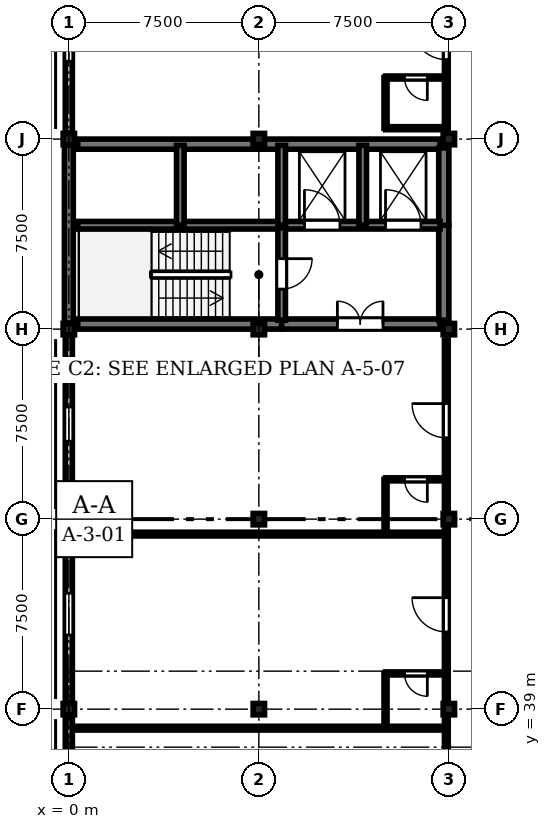
"""IFC4 building model, lengths in metres.
Left out: names, types, materials, properties, quantities, classifications, styles, units other than length and angle.
Written with IfcOpenShell. Run it as: python <this file> out.ifc"""

import sys

from ifc_helpers import new_model, si_unit, direction, frame, frame_2d, origin, origin_2d, place, context, subcontext, project, spatial, rectangle, extrude, element, fill, save


model = new_model("IFC4")
c1 = context("Model", 3, precision=1e-05, world=origin(), true_north=direction((0.0, 1.0)))
c2 = subcontext(c1, "Body", "Model", "MODEL_VIEW")
j1 = project(units=[si_unit("LENGTHUNIT", "METRE"), si_unit("PLANEANGLEUNIT", "RADIAN")], contexts=[c1])
p1 = place(None, origin())
s1 = spatial("IfcSite", under=j1, at=p1, CompositionType="ELEMENT")
p2 = place(p1, origin())
s2 = spatial("IfcBuilding", under=s1, at=p2, CompositionType="ELEMENT")
p3 = place(p2, frame((0.0, 0.0, 30.0)))
s3 = spatial("IfcBuildingStorey", under=s2, at=p3, CompositionType="ELEMENT", Elevation=30.0)
for number, where, z_axis, x_axis in (
    (1, (0.0, 39.0, 0.0), (0.0, 0.0, 1.0), (1.0, 0.0, 0.0)),
    (2, (0.0, 46.5, 0.0), (0.0, 0.0, 1.0), (1.0, 0.0, 0.0)),
    (3, (0.0, 54.0, 0.0), (0.0, 0.0, 1.0), (1.0, 0.0, 0.0)),
    (4, (0.0, 61.5, 0.0), (0.0, 0.0, 1.0), (1.0, 0.0, 0.0)),
    (5, (7.5, 39.0, 0.0), (0.0, 0.0, 1.0), (1.0, 0.0, 0.0)),
    (6, (7.5, 46.5, 0.0), (0.0, 0.0, 1.0), (1.0, 0.0, 0.0)),
    (7, (7.5, 54.0, 0.0), (0.0, 0.0, 1.0), (1.0, 0.0, 0.0)),
    (8, (7.5, 61.5, 0.0), (0.0, 0.0, 1.0), (1.0, 0.0, 0.0)),
    (9, (15.0, 39.0, 0.0), (0.0, 0.0, 1.0), (1.0, 0.0, 0.0)),
    (10, (15.0, 46.5, 0.0), (0.0, 0.0, 1.0), (1.0, 0.0, 0.0)),
    (11, (15.0, 54.0, 0.0), (0.0, 0.0, 1.0), (1.0, 0.0, 0.0)),
    (12, (15.0, 61.5, 0.0), (0.0, 0.0, 1.0), (1.0, 0.0, 0.0)),
):
    element("IfcColumn", number, at=place(p3, frame(where, z_axis=z_axis, x_axis=x_axis)), inside=s3, PredefinedType="COLUMN", context=c2, shape_type="SweptSolid", body=[
        extrude(rectangle(XDim=0.45, YDim=0.45, at=origin_2d()), origin(), (0.0, 0.0, 1.0), 4.05),
    ])
p4 = place(p3, frame((0.0, 31.735, 0.0), z_axis=(0.0, 0.0, 1.0), x_axis=(0.0, 1.0, 0.0)))
e13 = element("IfcWall", 13, at=p4, inside=s3, PredefinedType="STANDARD", context=c2, shape_type="SweptSolid", body=[
    extrude(rectangle(XDim=7.03, YDim=0.28, at=frame_2d((3.515, 0.0))), origin(), (0.0, 0.0, 1.0), 3.83),
])
p5 = place(p4, frame((2.84, 0.0, 0.85)))
e14 = element("IfcOpeningElement", 14, at=p5, cuts=e13, PredefinedType="OPENING", context=c2, shape_type="SweptSolid", body=[
    extrude(rectangle(XDim=1.35, YDim=2.25, at=frame_2d((0.675, 1.125))), frame((0.0, 0.15, 0.0), z_axis=(0.0, -1.0, 0.0), x_axis=(1.0, 0.0, 0.0)), (0.0, 0.0, 1.0), 0.3),
])
p6 = place(p3, frame((0.0, 39.235, 0.0), z_axis=(0.0, 0.0, 1.0), x_axis=(0.0, 1.0, 0.0)))
e15 = element("IfcWall", 15, at=p6, inside=s3, PredefinedType="STANDARD", context=c2, shape_type="SweptSolid", body=[
    extrude(rectangle(XDim=7.03, YDim=0.28, at=frame_2d((3.515, 0.0))), origin(), (0.0, 0.0, 1.0), 3.83),
])
p7 = place(p6, frame((2.69, 0.0, 0.85)))
e16 = element("IfcOpeningElement", 16, at=p7, cuts=e15, PredefinedType="OPENING", context=c2, shape_type="SweptSolid", body=[
    extrude(rectangle(XDim=1.65, YDim=2.25, at=frame_2d((0.825, 1.125))), frame((0.0, 0.15, 0.0), z_axis=(0.0, -1.0, 0.0), x_axis=(1.0, 0.0, 0.0)), (0.0, 0.0, 1.0), 0.3),
])
p8 = place(p3, frame((0.0, 46.735, 0.0), z_axis=(0.0, 0.0, 1.0), x_axis=(0.0, 1.0, 0.0)))
e17 = element("IfcWall", 17, at=p8, inside=s3, PredefinedType="STANDARD", context=c2, shape_type="SweptSolid", body=[
    extrude(rectangle(XDim=7.03, YDim=0.28, at=frame_2d((3.515, 0.0))), origin(), (0.0, 0.0, 1.0), 3.83),
])
p9 = place(p8, frame((2.84, 0.0, 0.85)))
e18 = element("IfcOpeningElement", 18, at=p9, cuts=e17, PredefinedType="OPENING", context=c2, shape_type="SweptSolid", body=[
    extrude(rectangle(XDim=1.35, YDim=2.25, at=frame_2d((0.675, 1.125))), frame((0.0, 0.15, 0.0), z_axis=(0.0, -1.0, 0.0), x_axis=(1.0, 0.0, 0.0)), (0.0, 0.0, 1.0), 0.3),
])
p10 = place(p3, frame((0.0, 54.235, 0.0), z_axis=(0.0, 0.0, 1.0), x_axis=(0.0, 1.0, 0.0)))
e19 = element("IfcWall", 19, at=p10, inside=s3, PredefinedType="SHEAR", context=c2, shape_type="SweptSolid", body=[
    extrude(rectangle(XDim=7.03, YDim=0.35, at=frame_2d((3.515, 0.0))), origin(), (0.0, 0.0, 1.0), 3.83),
])
p11 = place(p3, frame((0.0, 61.735, 0.0), z_axis=(0.0, 0.0, 1.0), x_axis=(0.0, 1.0, 0.0)))
e20 = element("IfcWall", 20, at=p11, inside=s3, PredefinedType="STANDARD", context=c2, shape_type="SweptSolid", body=[
    extrude(rectangle(XDim=7.03, YDim=0.28, at=frame_2d((3.515, 0.0))), origin(), (0.0, 0.0, 1.0), 3.83),
])
p12 = place(p11, frame((2.84, 0.0, 0.85)))
e21 = element("IfcOpeningElement", 21, at=p12, cuts=e20, PredefinedType="OPENING", context=c2, shape_type="SweptSolid", body=[
    extrude(rectangle(XDim=1.35, YDim=2.25, at=frame_2d((0.675, 1.125))), frame((0.0, 0.15, 0.0), z_axis=(0.0, -1.0, 0.0), x_axis=(1.0, 0.0, 0.0)), (0.0, 0.0, 1.0), 0.3),
])
p13 = place(p3, frame((0.35, 54.2, 0.0), z_axis=(0.0, 0.0, 1.0), x_axis=(1.0, 0.0, 0.0)))
e22 = element("IfcWall", 22, at=p13, inside=s3, PredefinedType="SHEAR", context=c2, shape_type="SweptSolid", body=[
    extrude(rectangle(XDim=8.05, YDim=0.4, at=frame_2d((4.025, 0.0))), origin(), (0.0, 0.0, 1.0), 3.83),
])
p14 = place(p3, frame((8.4, 54.2, 0.0), z_axis=(0.0, 0.0, 1.0), x_axis=(1.0, 0.0, 0.0)))
e23 = element("IfcWall", 23, at=p14, inside=s3, PredefinedType="SHEAR", context=c2, shape_type="SweptSolid", body=[
    extrude(rectangle(XDim=6.25, YDim=0.4, at=frame_2d((3.125, 0.0))), origin(), (0.0, 0.0, 1.0), 3.83),
])
p15 = place(p14, frame((2.2, 0.0, 0.0)))
e24 = element("IfcOpeningElement", 24, at=p15, cuts=e23, PredefinedType="OPENING", context=c2, shape_type="SweptSolid", body=[
    extrude(rectangle(XDim=1.8, YDim=2.25, at=frame_2d((0.9, 1.125))), frame((0.0, 0.21, 0.0), z_axis=(0.0, -1.0, 0.0), x_axis=(1.0, 0.0, 0.0)), (0.0, 0.0, 1.0), 0.42),
])
p16 = place(p3, frame((0.35, 61.3, 0.0), z_axis=(0.0, 0.0, 1.0), x_axis=(1.0, 0.0, 0.0)))
e25 = element("IfcWall", 25, at=p16, inside=s3, PredefinedType="SHEAR", context=c2, shape_type="SweptSolid", body=[
    extrude(rectangle(XDim=14.3, YDim=0.4, at=frame_2d((7.15, 0.0))), origin(), (0.0, 0.0, 1.0), 3.83),
])
p17 = place(p3, frame((14.8, 54.35, 0.0), z_axis=(0.0, 0.0, 1.0), x_axis=(0.0, 1.0, 0.0)))
e26 = element("IfcWall", 26, at=p17, inside=s3, PredefinedType="SHEAR", context=c2, shape_type="SweptSolid", body=[
    extrude(rectangle(XDim=3.75, YDim=0.4, at=frame_2d((1.875, 0.0))), origin(), (0.0, 0.0, 1.0), 3.83),
])
p18 = place(p3, frame((14.8, 58.1, 0.0), z_axis=(0.0, 0.0, 1.0), x_axis=(0.0, 1.0, 0.0)))
e27 = element("IfcWall", 27, at=p18, inside=s3, PredefinedType="SHEAR", context=c2, shape_type="SweptSolid", body=[
    extrude(rectangle(XDim=3.05, YDim=0.4, at=frame_2d((1.525, 0.0))), origin(), (0.0, 0.0, 1.0), 3.83),
])
p19 = place(p3, frame((0.35, 58.1, 0.0), z_axis=(0.0, 0.0, 1.0), x_axis=(1.0, 0.0, 0.0)))
e28 = element("IfcWall", 28, at=p19, inside=s3, PredefinedType="SHEAR", context=c2, shape_type="SweptSolid", body=[
    extrude(rectangle(XDim=8.05, YDim=0.3, at=frame_2d((4.025, 0.0))), origin(), (0.0, 0.0, 1.0), 3.83),
])
p20 = place(p3, frame((8.4, 58.1, 0.0), z_axis=(0.0, 0.0, 1.0), x_axis=(1.0, 0.0, 0.0)))
e29 = element("IfcWall", 29, at=p20, inside=s3, PredefinedType="SHEAR", context=c2, shape_type="SweptSolid", body=[
    extrude(rectangle(XDim=6.25, YDim=0.3, at=frame_2d((3.125, 0.0))), origin(), (0.0, 0.0, 1.0), 3.83),
])
p21 = place(p20, frame((0.9, 0.0, 0.0)))
e30 = element("IfcOpeningElement", 30, at=p21, cuts=e29, PredefinedType="OPENING", context=c2, shape_type="SweptSolid", body=[
    extrude(rectangle(XDim=1.4, YDim=2.25, at=frame_2d((0.7, 1.125))), frame((0.0, 0.16, 0.0), z_axis=(0.0, -1.0, 0.0), x_axis=(1.0, 0.0, 0.0)), (0.0, 0.0, 1.0), 0.32),
])
p22 = place(p20, frame((4.1, 0.0, 0.0)))
e31 = element("IfcOpeningElement", 31, at=p22, cuts=e29, PredefinedType="OPENING", context=c2, shape_type="SweptSolid", body=[
    extrude(rectangle(XDim=1.4, YDim=2.25, at=frame_2d((0.7, 1.125))), frame((0.0, 0.16, 0.0), z_axis=(0.0, -1.0, 0.0), x_axis=(1.0, 0.0, 0.0)), (0.0, 0.0, 1.0), 0.32),
])
p23 = place(p3, frame((8.4, 58.0, 0.0), z_axis=(0.0, 0.0, 1.0), x_axis=(0.0, -1.0, 0.0)))
e32 = element("IfcWall", 32, at=p23, inside=s3, PredefinedType="SHEAR", context=c2, shape_type="SweptSolid", body=[
    extrude(rectangle(XDim=3.65, YDim=0.3, at=frame_2d((1.825, 0.0))), origin(), (0.0, 0.0, 1.0), 3.83),
])
p24 = place(p23, frame((1.22, 0.0, 0.0)))
e33 = element("IfcOpeningElement", 33, at=p24, cuts=e32, PredefinedType="OPENING", context=c2, shape_type="SweptSolid", body=[
    extrude(rectangle(XDim=1.2, YDim=2.25, at=frame_2d((0.6, 1.125))), frame((0.0, 0.16, 0.0), z_axis=(0.0, -1.0, 0.0), x_axis=(1.0, 0.0, 0.0)), (0.0, 0.0, 1.0), 0.32),
])
for number, where, z_axis, x_axis in (
    (34, (4.4, 58.1, 0.0), (0.0, 0.0, 1.0), (0.0, 1.0, 0.0)),
    (35, (8.4, 58.1, 0.0), (0.0, 0.0, 1.0), (0.0, 1.0, 0.0)),
    (36, (11.6, 58.1, 0.0), (0.0, 0.0, 1.0), (0.0, 1.0, 0.0)),
):
    element("IfcWall", number, at=place(p3, frame(where, z_axis=z_axis, x_axis=x_axis)), inside=s3, PredefinedType="SHEAR", context=c2, shape_type="SweptSolid", body=[
        extrude(rectangle(XDim=3.15, YDim=0.3, at=frame_2d((1.575, 0.0))), origin(), (0.0, 0.0, 1.0), 3.83),
    ])
p25 = place(p3, frame((14.9, 30.75, 0.0), z_axis=(0.0, 0.0, 1.0), x_axis=(0.0, 1.0, 0.0)))
e37 = element("IfcWall", 37, at=p25, inside=s3, PredefinedType="PARTITIONING", context=c2, shape_type="SweptSolid", body=[
    extrude(rectangle(XDim=7.5, YDim=0.15, at=frame_2d((3.75, 0.0))), origin(), (0.0, 0.0, 1.0), 3.815),
])
p26 = place(p25, frame((3.64, 0.0, 0.0)))
e38 = element("IfcOpeningElement", 38, at=p26, cuts=e37, PredefinedType="OPENING", context=c2, shape_type="SweptSolid", body=[
    extrude(rectangle(XDim=1.35, YDim=2.25, at=frame_2d((0.675, 1.125))), frame((0.0, 0.085, 0.0), z_axis=(0.0, -1.0, 0.0), x_axis=(1.0, 0.0, 0.0)), (0.0, 0.0, 1.0), 0.17),
])
p27 = place(p3, frame((14.9, 38.41, 0.0), z_axis=(0.0, 0.0, 1.0), x_axis=(0.0, 1.0, 0.0)))
e39 = element("IfcWall", 39, at=p27, inside=s3, PredefinedType="PARTITIONING", context=c2, shape_type="SweptSolid", body=[
    extrude(rectangle(XDim=7.5, YDim=0.15, at=frame_2d((3.75, 0.0))), origin(), (0.0, 0.0, 1.0), 3.815),
])
p28 = place(p27, frame((3.64, 0.0, 0.0)))
e40 = element("IfcOpeningElement", 40, at=p28, cuts=e39, PredefinedType="OPENING", context=c2, shape_type="SweptSolid", body=[
    extrude(rectangle(XDim=1.35, YDim=2.25, at=frame_2d((0.675, 1.125))), frame((0.0, 0.085, 0.0), z_axis=(0.0, -1.0, 0.0), x_axis=(1.0, 0.0, 0.0)), (0.0, 0.0, 1.0), 0.17),
])
p29 = place(p3, frame((14.9, 40.41, 0.0), z_axis=(0.0, 0.0, 1.0), x_axis=(-1.0, 0.0, 0.0)))
e41 = element("IfcWall", 41, at=p29, inside=s3, PredefinedType="PARTITIONING", context=c2, shape_type="SweptSolid", body=[
    extrude(rectangle(XDim=2.4, YDim=0.12, at=frame_2d((1.2, 0.0))), origin(), (0.0, 0.0, 1.0), 3.815),
])
p30 = place(p29, frame((0.75, 0.0, 0.0)))
e42 = element("IfcOpeningElement", 42, at=p30, cuts=e41, PredefinedType="OPENING", context=c2, shape_type="SweptSolid", body=[
    extrude(rectangle(XDim=0.9, YDim=2.1, at=frame_2d((0.45, 1.05))), frame((0.0, 0.07, 0.0), z_axis=(0.0, -1.0, 0.0), x_axis=(1.0, 0.0, 0.0)), (0.0, 0.0, 1.0), 0.14),
])
p31 = place(p3, frame((12.5, 38.41, 0.0), z_axis=(0.0, 0.0, 1.0), x_axis=(0.0, 1.0, 0.0)))
e43 = element("IfcWall", 43, at=p31, inside=s3, PredefinedType="PARTITIONING", context=c2, shape_type="SweptSolid", body=[
    extrude(rectangle(XDim=2.0, YDim=0.12, at=frame_2d((1.0, 0.0))), origin(), (0.0, 0.0, 1.0), 3.815),
])
p32 = place(p3, frame((14.9, 46.07, 0.0), z_axis=(0.0, 0.0, 1.0), x_axis=(0.0, 1.0, 0.0)))
e44 = element("IfcWall", 44, at=p32, inside=s3, PredefinedType="PARTITIONING", context=c2, shape_type="SweptSolid", body=[
    extrude(rectangle(XDim=7.5, YDim=0.15, at=frame_2d((3.75, 0.0))), origin(), (0.0, 0.0, 1.0), 3.815),
])
p33 = place(p32, frame((3.64, 0.0, 0.0)))
e45 = element("IfcOpeningElement", 45, at=p33, cuts=e44, PredefinedType="OPENING", context=c2, shape_type="SweptSolid", body=[
    extrude(rectangle(XDim=1.35, YDim=2.25, at=frame_2d((0.675, 1.125))), frame((0.0, 0.085, 0.0), z_axis=(0.0, -1.0, 0.0), x_axis=(1.0, 0.0, 0.0)), (0.0, 0.0, 1.0), 0.17),
])
p34 = place(p3, frame((14.9, 48.07, 0.0), z_axis=(0.0, 0.0, 1.0), x_axis=(-1.0, 0.0, 0.0)))
e46 = element("IfcWall", 46, at=p34, inside=s3, PredefinedType="PARTITIONING", context=c2, shape_type="SweptSolid", body=[
    extrude(rectangle(XDim=2.4, YDim=0.12, at=frame_2d((1.2, 0.0))), origin(), (0.0, 0.0, 1.0), 3.815),
])
p35 = place(p34, frame((0.75, 0.0, 0.0)))
e47 = element("IfcOpeningElement", 47, at=p35, cuts=e46, PredefinedType="OPENING", context=c2, shape_type="SweptSolid", body=[
    extrude(rectangle(XDim=0.9, YDim=2.1, at=frame_2d((0.45, 1.05))), frame((0.0, 0.07, 0.0), z_axis=(0.0, -1.0, 0.0), x_axis=(1.0, 0.0, 0.0)), (0.0, 0.0, 1.0), 0.14),
])
p36 = place(p3, frame((12.5, 46.07, 0.0), z_axis=(0.0, 0.0, 1.0), x_axis=(0.0, 1.0, 0.0)))
e48 = element("IfcWall", 48, at=p36, inside=s3, PredefinedType="PARTITIONING", context=c2, shape_type="SweptSolid", body=[
    extrude(rectangle(XDim=2.0, YDim=0.12, at=frame_2d((1.0, 0.0))), origin(), (0.0, 0.0, 1.0), 3.815),
])
p37 = place(p3, frame((14.9, 61.93, 0.0), z_axis=(0.0, 0.0, 1.0), x_axis=(0.0, 1.0, 0.0)))
e49 = element("IfcWall", 49, at=p37, inside=s3, PredefinedType="PARTITIONING", context=c2, shape_type="SweptSolid", body=[
    extrude(rectangle(XDim=14.14, YDim=0.15, at=frame_2d((7.07, 0.0))), origin(), (0.0, 0.0, 1.0), 3.815),
])
p38 = place(p37, frame((2.708, 0.0, 0.0)))
e50 = element("IfcOpeningElement", 50, at=p38, cuts=e49, PredefinedType="OPENING", context=c2, shape_type="SweptSolid", body=[
    extrude(rectangle(XDim=1.35, YDim=2.25, at=frame_2d((0.675, 1.125))), frame((0.0, 0.085, 0.0), z_axis=(0.0, -1.0, 0.0), x_axis=(1.0, 0.0, 0.0)), (0.0, 0.0, 1.0), 0.17),
])
p39 = place(p3, frame((14.9, 63.93, 0.0), z_axis=(0.0, 0.0, 1.0), x_axis=(-1.0, 0.0, 0.0)))
e51 = element("IfcWall", 51, at=p39, inside=s3, PredefinedType="PARTITIONING", context=c2, shape_type="SweptSolid", body=[
    extrude(rectangle(XDim=2.4, YDim=0.12, at=frame_2d((1.2, 0.0))), origin(), (0.0, 0.0, 1.0), 3.815),
])
p40 = place(p39, frame((0.75, 0.0, 0.0)))
e52 = element("IfcOpeningElement", 52, at=p40, cuts=e51, PredefinedType="OPENING", context=c2, shape_type="SweptSolid", body=[
    extrude(rectangle(XDim=0.9, YDim=2.1, at=frame_2d((0.45, 1.05))), frame((0.0, 0.07, 0.0), z_axis=(0.0, -1.0, 0.0), x_axis=(1.0, 0.0, 0.0)), (0.0, 0.0, 1.0), 0.14),
])
p41 = place(p3, frame((12.5, 61.93, 0.0), z_axis=(0.0, 0.0, 1.0), x_axis=(0.0, 1.0, 0.0)))
e53 = element("IfcWall", 53, at=p41, inside=s3, PredefinedType="PARTITIONING", context=c2, shape_type="SweptSolid", body=[
    extrude(rectangle(XDim=2.0, YDim=0.12, at=frame_2d((1.0, 0.0))), origin(), (0.0, 0.0, 1.0), 3.815),
])
for number, where, z_axis, x_axis in (
    (54, (0.35, 38.25, 0.0), (0.0, 0.0, 1.0), (1.0, 0.0, 0.0)),
    (55, (0.35, 45.91, 0.0), (0.0, 0.0, 1.0), (1.0, 0.0, 0.0)),
):
    element("IfcWall", number, at=place(p3, frame(where, z_axis=z_axis, x_axis=x_axis)), inside=s3, PredefinedType="PARTITIONING", context=c2, shape_type="SweptSolid", body=[
        extrude(rectangle(XDim=14.55, YDim=0.15, at=frame_2d((7.275, 0.0))), origin(), (0.0, 0.0, 1.0), 3.815),
    ])
p42 = place(p3, frame((12.5, 61.93, 0.0), z_axis=(0.0, 0.0, 1.0), x_axis=(1.0, 0.0, 0.0)))
e56 = element("IfcWall", 56, at=p42, inside=s3, PredefinedType="PARTITIONING", context=c2, shape_type="SweptSolid", body=[
    extrude(rectangle(XDim=2.4, YDim=0.12, at=frame_2d((1.2, 0.0))), origin(), (0.0, 0.0, 1.0), 3.815),
])
p43 = place(p7, origin())
e57 = element("IfcWindow", 57, at=p43, inside=s3, PartitioningType="SINGLE_PANEL", PredefinedType="WINDOW", context=c2, shape_type="SweptSolid", body=[
    extrude(rectangle(XDim=1.65, YDim=2.25, at=frame_2d((0.825, 1.125))), frame((0.0, 0.03, 0.0), z_axis=(0.0, -1.0, 0.0), x_axis=(1.0, 0.0, 0.0)), (0.0, 0.0, 1.0), 0.06),
])
fill(e16, e57)
p44 = place(p9, origin())
e58 = element("IfcWindow", 58, at=p44, inside=s3, PartitioningType="SINGLE_PANEL", PredefinedType="WINDOW", context=c2, shape_type="SweptSolid", body=[
    extrude(rectangle(XDim=1.35, YDim=2.25, at=frame_2d((0.675, 1.125))), frame((0.0, 0.03, 0.0), z_axis=(0.0, -1.0, 0.0), x_axis=(1.0, 0.0, 0.0)), (0.0, 0.0, 1.0), 0.06),
])
fill(e18, e58)
p45 = place(p12, origin())
e59 = element("IfcWindow", 59, at=p45, inside=s3, PartitioningType="SINGLE_PANEL", PredefinedType="WINDOW", context=c2, shape_type="SweptSolid", body=[
    extrude(rectangle(XDim=1.35, YDim=2.25, at=frame_2d((0.675, 1.125))), frame((0.0, 0.03, 0.0), z_axis=(0.0, -1.0, 0.0), x_axis=(1.0, 0.0, 0.0)), (0.0, 0.0, 1.0), 0.06),
])
fill(e21, e59)
p46 = place(p15, origin())
e60 = element("IfcDoor", 60, at=p46, inside=s3, OperationType="DOUBLE_DOOR_SINGLE_SWING", PredefinedType="DOOR", context=c2, shape_type="SweptSolid", body=[
    extrude(rectangle(XDim=1.8, YDim=2.25, at=frame_2d((0.9, 1.125))), frame((0.0, 0.025, 0.0), z_axis=(0.0, -1.0, 0.0), x_axis=(1.0, 0.0, 0.0)), (0.0, 0.0, 1.0), 0.05),
])
fill(e24, e60)
p47 = place(p21, origin())
e61 = element("IfcDoor", 61, at=p47, inside=s3, OperationType="DOUBLE_DOOR_SLIDING", PredefinedType="DOOR", context=c2, shape_type="SweptSolid", body=[
    extrude(rectangle(XDim=1.4, YDim=2.25, at=frame_2d((0.7, 1.125))), frame((0.0, 0.025, 0.0), z_axis=(0.0, -1.0, 0.0), x_axis=(1.0, 0.0, 0.0)), (0.0, 0.0, 1.0), 0.05),
])
fill(e30, e61)
p48 = place(p22, origin())
e62 = element("IfcDoor", 62, at=p48, inside=s3, OperationType="DOUBLE_DOOR_SLIDING", PredefinedType="DOOR", context=c2, shape_type="SweptSolid", body=[
    extrude(rectangle(XDim=1.4, YDim=2.25, at=frame_2d((0.7, 1.125))), frame((0.0, 0.025, 0.0), z_axis=(0.0, -1.0, 0.0), x_axis=(1.0, 0.0, 0.0)), (0.0, 0.0, 1.0), 0.05),
])
fill(e31, e62)
p49 = place(p24, origin())
e63 = element("IfcDoor", 63, at=p49, inside=s3, OperationType="SINGLE_SWING_LEFT", PredefinedType="DOOR", context=c2, shape_type="SweptSolid", body=[
    extrude(rectangle(XDim=1.2, YDim=2.25, at=frame_2d((0.6, 1.125))), frame((0.0, 0.025, 0.0), z_axis=(0.0, -1.0, 0.0), x_axis=(1.0, 0.0, 0.0)), (0.0, 0.0, 1.0), 0.05),
])
fill(e33, e63)
p50 = place(p28, origin())
e64 = element("IfcDoor", 64, at=p50, inside=s3, OperationType="SINGLE_SWING_RIGHT", PredefinedType="DOOR", context=c2, shape_type="SweptSolid", body=[
    extrude(rectangle(XDim=1.35, YDim=2.25, at=frame_2d((0.675, 1.125))), frame((0.0, 0.025, 0.0), z_axis=(0.0, -1.0, 0.0), x_axis=(1.0, 0.0, 0.0)), (0.0, 0.0, 1.0), 0.05),
])
fill(e40, e64)
p51 = place(p30, origin())
e65 = element("IfcDoor", 65, at=p51, inside=s3, OperationType="SINGLE_SWING_LEFT", PredefinedType="DOOR", context=c2, shape_type="SweptSolid", body=[
    extrude(rectangle(XDim=0.9, YDim=2.1, at=frame_2d((0.45, 1.05))), frame((0.0, 0.025, 0.0), z_axis=(0.0, -1.0, 0.0), x_axis=(1.0, 0.0, 0.0)), (0.0, 0.0, 1.0), 0.05),
])
fill(e42, e65)
p52 = place(p33, origin())
e66 = element("IfcDoor", 66, at=p52, inside=s3, OperationType="SINGLE_SWING_RIGHT", PredefinedType="DOOR", context=c2, shape_type="SweptSolid", body=[
    extrude(rectangle(XDim=1.35, YDim=2.25, at=frame_2d((0.675, 1.125))), frame((0.0, 0.025, 0.0), z_axis=(0.0, -1.0, 0.0), x_axis=(1.0, 0.0, 0.0)), (0.0, 0.0, 1.0), 0.05),
])
fill(e45, e66)
p53 = place(p35, origin())
e67 = element("IfcDoor", 67, at=p53, inside=s3, OperationType="SINGLE_SWING_LEFT", PredefinedType="DOOR", context=c2, shape_type="SweptSolid", body=[
    extrude(rectangle(XDim=0.9, YDim=2.1, at=frame_2d((0.45, 1.05))), frame((0.0, 0.025, 0.0), z_axis=(0.0, -1.0, 0.0), x_axis=(1.0, 0.0, 0.0)), (0.0, 0.0, 1.0), 0.05),
])
fill(e47, e67)
p54 = place(p38, origin())
e68 = element("IfcDoor", 68, at=p54, inside=s3, OperationType="SINGLE_SWING_RIGHT", PredefinedType="DOOR", context=c2, shape_type="SweptSolid", body=[
    extrude(rectangle(XDim=1.35, YDim=2.25, at=frame_2d((0.675, 1.125))), frame((0.0, 0.025, 0.0), z_axis=(0.0, -1.0, 0.0), x_axis=(1.0, 0.0, 0.0)), (0.0, 0.0, 1.0), 0.05),
])
fill(e50, e68)
p55 = place(p40, origin())
e69 = element("IfcDoor", 69, at=p55, inside=s3, OperationType="SINGLE_SWING_LEFT", PredefinedType="DOOR", context=c2, shape_type="SweptSolid", body=[
    extrude(rectangle(XDim=0.9, YDim=2.1, at=frame_2d((0.45, 1.05))), frame((0.0, 0.025, 0.0), z_axis=(0.0, -1.0, 0.0), x_axis=(1.0, 0.0, 0.0)), (0.0, 0.0, 1.0), 0.05),
])
fill(e52, e69)
save(model, sys.argv[1])
